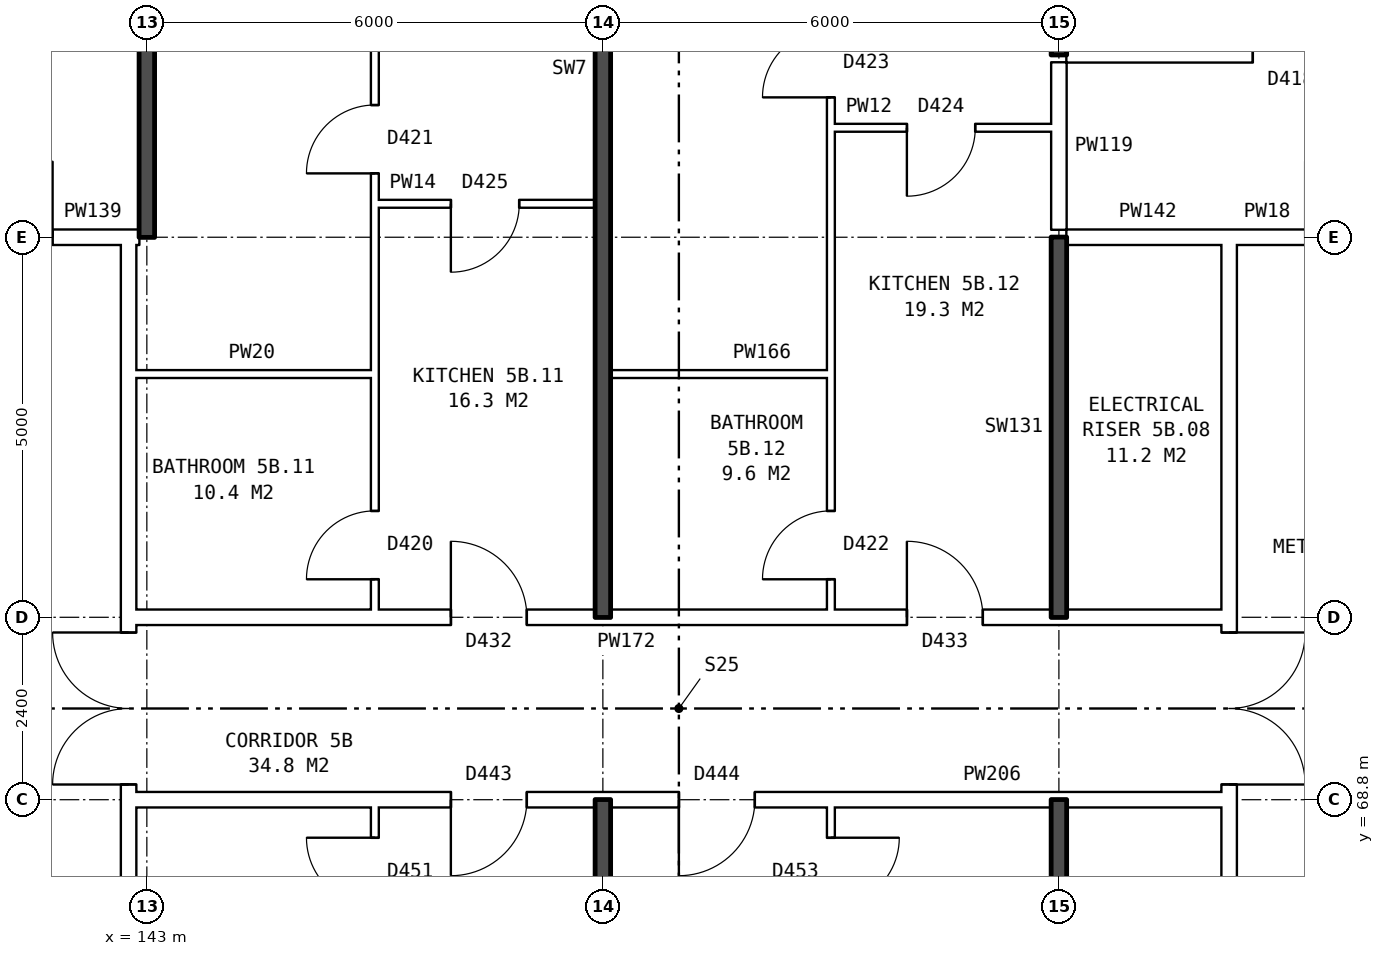
"""IFC4 building model, lengths in metres.
Left out: names, types, materials, properties, quantities, classifications, styles, units other than length and angle.
Written with IfcOpenShell. Run it as: python <this file> out.ifc"""

import sys

from ifc_helpers import new_model, si_unit, direction, frame, frame_2d, origin, place, context, subcontext, project, spatial, rectangle, extrude, element, fill, save


model = new_model("IFC4")
c1 = context("Model", 3, precision=1e-05, world=origin(), true_north=direction((0.0, 1.0)))
c2 = subcontext(c1, "Body", "Model", "MODEL_VIEW")
j1 = project(units=[si_unit("LENGTHUNIT", "METRE"), si_unit("PLANEANGLEUNIT", "RADIAN")], contexts=[c1])
p1 = place(None, origin())
s1 = spatial("IfcSite", under=j1, at=p1, CompositionType="ELEMENT")
p2 = place(p1, origin())
s2 = spatial("IfcBuilding", under=s1, at=p2, CompositionType="ELEMENT")
p3 = place(p2, frame((0.0, 0.0, 22.6)))
s3 = spatial("IfcBuildingStorey", under=s2, at=p3, CompositionType="ELEMENT", Elevation=22.6)
p4 = place(p3, frame((142.76, 63.9, 0.0), z_axis=(0.0, 0.0, 1.0), x_axis=(0.0, 1.0, 0.0)))
e1 = element("IfcWall", 1, at=p4, inside=s3, PredefinedType="PARTITIONING", context=c2, shape_type="SweptSolid", body=[
    extrude(rectangle(XDim=12.2, YDim=0.2, at=frame_2d((6.1, 0.0))), origin(), (0.0, 0.0, 1.0), 2.85),
])
p5 = place(p4, frame((5.1, 0.0, 0.0)))
e2 = element("IfcOpeningElement", 2, at=p5, cuts=e1, PredefinedType="OPENING", context=c2, shape_type="SweptSolid", body=[
    extrude(rectangle(XDim=2.0, YDim=2.1, at=frame_2d((1.0, 1.05))), frame((0.0, 0.11, 0.0), z_axis=(0.0, -1.0, 0.0), x_axis=(1.0, 0.0, 0.0)), (0.0, 0.0, 1.0), 0.22),
])
p6 = place(p3, frame((157.24, 63.9, 0.0), z_axis=(0.0, 0.0, 1.0), x_axis=(0.0, 1.0, 0.0)))
e3 = element("IfcWall", 3, at=p6, inside=s3, PredefinedType="PARTITIONING", context=c2, shape_type="SweptSolid", body=[
    extrude(rectangle(XDim=12.2, YDim=0.2, at=frame_2d((6.1, 0.0))), origin(), (0.0, 0.0, 1.0), 2.85),
])
p7 = place(p6, frame((5.1, 0.0, 0.0)))
e4 = element("IfcOpeningElement", 4, at=p7, cuts=e3, PredefinedType="OPENING", context=c2, shape_type="SweptSolid", body=[
    extrude(rectangle(XDim=2.0, YDim=2.1, at=frame_2d((1.0, 1.05))), frame((0.0, 0.11, 0.0), z_axis=(0.0, -1.0, 0.0), x_axis=(1.0, 0.0, 0.0)), (0.0, 0.0, 1.0), 0.22),
])
p8 = place(p3, frame((142.76, 68.8, 0.0), z_axis=(0.0, 0.0, 1.0), x_axis=(1.0, 0.0, 0.0)))
e5 = element("IfcWall", 5, at=p8, inside=s3, PredefinedType="PARTITIONING", context=c2, shape_type="SweptSolid", body=[
    extrude(rectangle(XDim=14.48, YDim=0.2, at=frame_2d((7.24, 0.0))), origin(), (0.0, 0.0, 1.0), 2.85),
])
p9 = place(p8, frame((4.24, 0.0, 0.0)))
e6 = element("IfcOpeningElement", 6, at=p9, cuts=e5, PredefinedType="OPENING", context=c2, shape_type="SweptSolid", body=[
    extrude(rectangle(XDim=1.0, YDim=2.1, at=frame_2d((0.5, 1.05))), frame((0.0, 0.11, 0.0), z_axis=(0.0, -1.0, 0.0), x_axis=(1.0, 0.0, 0.0)), (0.0, 0.0, 1.0), 0.22),
])
p10 = place(p8, frame((7.24, 0.0, 0.0)))
e7 = element("IfcOpeningElement", 7, at=p10, cuts=e5, PredefinedType="OPENING", context=c2, shape_type="SweptSolid", body=[
    extrude(rectangle(XDim=1.0, YDim=2.1, at=frame_2d((0.5, 1.05))), frame((0.0, 0.11, 0.0), z_axis=(0.0, -1.0, 0.0), x_axis=(1.0, 0.0, 0.0)), (0.0, 0.0, 1.0), 0.22),
])
p11 = place(p3, frame((142.76, 71.2, 0.0), z_axis=(0.0, 0.0, 1.0), x_axis=(1.0, 0.0, 0.0)))
e8 = element("IfcWall", 8, at=p11, inside=s3, PredefinedType="PARTITIONING", context=c2, shape_type="SweptSolid", body=[
    extrude(rectangle(XDim=14.48, YDim=0.2, at=frame_2d((7.24, 0.0))), origin(), (0.0, 0.0, 1.0), 2.85),
])
p12 = place(p11, frame((4.24, 0.0, 0.0)))
e9 = element("IfcOpeningElement", 9, at=p12, cuts=e8, PredefinedType="OPENING", context=c2, shape_type="SweptSolid", body=[
    extrude(rectangle(XDim=1.0, YDim=2.1, at=frame_2d((0.5, 1.05))), frame((0.0, 0.11, 0.0), z_axis=(0.0, -1.0, 0.0), x_axis=(1.0, 0.0, 0.0)), (0.0, 0.0, 1.0), 0.22),
])
p13 = place(p11, frame((10.24, 0.0, 0.0)))
e10 = element("IfcOpeningElement", 10, at=p13, cuts=e8, PredefinedType="OPENING", context=c2, shape_type="SweptSolid", body=[
    extrude(rectangle(XDim=1.0, YDim=2.1, at=frame_2d((0.5, 1.05))), frame((0.0, 0.11, 0.0), z_axis=(0.0, -1.0, 0.0), x_axis=(1.0, 0.0, 0.0)), (0.0, 0.0, 1.0), 0.22),
])
p14 = place(p3, frame((142.76, 74.4, 0.0), z_axis=(0.0, 0.0, 1.0), x_axis=(1.0, 0.0, 0.0)))
e11 = element("IfcWall", 11, at=p14, inside=s3, PredefinedType="PARTITIONING", context=c2, shape_type="SweptSolid", body=[
    extrude(rectangle(XDim=3.24, YDim=0.1, at=frame_2d((1.62, 0.0))), origin(), (0.0, 0.0, 1.0), 2.85),
])
p15 = place(p3, frame((149.1, 74.4, 0.0), z_axis=(0.0, 0.0, 1.0), x_axis=(1.0, 0.0, 0.0)))
e12 = element("IfcWall", 12, at=p15, inside=s3, PredefinedType="PARTITIONING", context=c2, shape_type="SweptSolid", body=[
    extrude(rectangle(XDim=2.9, YDim=0.1, at=frame_2d((1.45, 0.0))), origin(), (0.0, 0.0, 1.0), 2.85),
])
p16 = place(p3, frame((139.76, 76.2, 0.0), z_axis=(0.0, 0.0, 1.0), x_axis=(1.0, 0.0, 0.0)))
e13 = element("IfcWall", 13, at=p16, inside=s3, PredefinedType="PARTITIONING", context=c2, shape_type="SweptSolid", body=[
    extrude(rectangle(XDim=3.0, YDim=0.2, at=frame_2d((1.5, 0.0))), origin(), (0.0, 0.0, 1.0), 2.85),
])
p17 = place(p16, frame((1.0, 0.0, 0.0)))
e14 = element("IfcOpeningElement", 14, at=p17, cuts=e13, PredefinedType="OPENING", context=c2, shape_type="SweptSolid", body=[
    extrude(rectangle(XDim=1.0, YDim=2.1, at=frame_2d((0.5, 1.05))), frame((0.0, 0.11, 0.0), z_axis=(0.0, -1.0, 0.0), x_axis=(1.0, 0.0, 0.0)), (0.0, 0.0, 1.0), 0.22),
])
p18 = place(p3, frame((142.76, 76.2, 0.0), z_axis=(0.0, 0.0, 1.0), x_axis=(1.0, 0.0, 0.0)))
e15 = element("IfcWall", 15, at=p18, inside=s3, PredefinedType="PARTITIONING", context=c2, shape_type="SweptSolid", body=[
    extrude(rectangle(XDim=0.14, YDim=0.2, at=frame_2d((0.07, 0.0))), origin(), (0.0, 0.0, 1.0), 2.85),
])
p19 = place(p3, frame((155.1, 76.2, 0.0), z_axis=(0.0, 0.0, 1.0), x_axis=(1.0, 0.0, 0.0)))
e16 = element("IfcWall", 16, at=p19, inside=s3, PredefinedType="PARTITIONING", context=c2, shape_type="SweptSolid", body=[
    extrude(rectangle(XDim=2.14, YDim=0.2, at=frame_2d((1.07, 0.0))), origin(), (0.0, 0.0, 1.0), 2.85),
])
p20 = place(p3, frame((157.24, 76.2, 0.0), z_axis=(0.0, 0.0, 1.0), x_axis=(1.0, 0.0, 0.0)))
e17 = element("IfcWall", 17, at=p20, inside=s3, PredefinedType="PARTITIONING", context=c2, shape_type="SweptSolid", body=[
    extrude(rectangle(XDim=3.0, YDim=0.2, at=frame_2d((1.5, 0.0))), origin(), (0.0, 0.0, 1.0), 2.85),
])
p21 = place(p20, frame((1.0, 0.0, 0.0)))
e18 = element("IfcOpeningElement", 18, at=p21, cuts=e17, PredefinedType="OPENING", context=c2, shape_type="SweptSolid", body=[
    extrude(rectangle(XDim=1.0, YDim=2.1, at=frame_2d((0.5, 1.05))), frame((0.0, 0.11, 0.0), z_axis=(0.0, -1.0, 0.0), x_axis=(1.0, 0.0, 0.0)), (0.0, 0.0, 1.0), 0.22),
])
p22 = place(p3, frame((146.0, 76.64, 0.0), z_axis=(0.0, 0.0, 1.0), x_axis=(1.0, 0.0, 0.0)))
e19 = element("IfcWall", 19, at=p22, inside=s3, PredefinedType="PARTITIONING", context=c2, shape_type="SweptSolid", body=[
    extrude(rectangle(XDim=2.9, YDim=0.1, at=frame_2d((1.45, 0.0))), origin(), (0.0, 0.0, 1.0), 2.85),
])
p23 = place(p22, frame((1.0, 0.0, 0.0)))
e20 = element("IfcOpeningElement", 20, at=p23, cuts=e19, PredefinedType="OPENING", context=c2, shape_type="SweptSolid", body=[
    extrude(rectangle(XDim=0.9, YDim=2.1, at=frame_2d((0.45, 1.05))), frame((0.0, 0.06, 0.0), z_axis=(0.0, -1.0, 0.0), x_axis=(1.0, 0.0, 0.0)), (0.0, 0.0, 1.0), 0.12),
])
p24 = place(p3, frame((152.0, 77.64, 0.0), z_axis=(0.0, 0.0, 1.0), x_axis=(1.0, 0.0, 0.0)))
e21 = element("IfcWall", 21, at=p24, inside=s3, PredefinedType="PARTITIONING", context=c2, shape_type="SweptSolid", body=[
    extrude(rectangle(XDim=2.9, YDim=0.1, at=frame_2d((1.45, 0.0))), origin(), (0.0, 0.0, 1.0), 2.85),
])
p25 = place(p24, frame((1.0, 0.0, 0.0)))
e22 = element("IfcOpeningElement", 22, at=p25, cuts=e21, PredefinedType="OPENING", context=c2, shape_type="SweptSolid", body=[
    extrude(rectangle(XDim=0.9, YDim=2.1, at=frame_2d((0.45, 1.05))), frame((0.0, 0.06, 0.0), z_axis=(0.0, -1.0, 0.0), x_axis=(1.0, 0.0, 0.0)), (0.0, 0.0, 1.0), 0.12),
])
p26 = place(p3, frame((155.1, 78.6, 0.0), z_axis=(0.0, 0.0, 1.0), x_axis=(1.0, 0.0, 0.0)))
e23 = element("IfcWall", 23, at=p26, inside=s3, PredefinedType="PARTITIONING", context=c2, shape_type="SweptSolid", body=[
    extrude(rectangle(XDim=22.29, YDim=0.2, at=frame_2d((11.145, 0.0))), origin(), (0.0, 0.0, 1.0), 2.85),
])
p27 = place(p26, frame((2.45, 0.0, 0.0)))
e24 = element("IfcOpeningElement", 24, at=p27, cuts=e23, PredefinedType="OPENING", context=c2, shape_type="SweptSolid", body=[
    extrude(rectangle(XDim=1.0, YDim=2.1, at=frame_2d((0.5, 1.05))), frame((0.0, 0.11, 0.0), z_axis=(0.0, -1.0, 0.0), x_axis=(1.0, 0.0, 0.0)), (0.0, 0.0, 1.0), 0.22),
])
p28 = place(p26, frame((14.4, 0.0, 0.0)))
e25 = element("IfcOpeningElement", 25, at=p28, cuts=e23, PredefinedType="OPENING", context=c2, shape_type="SweptSolid", body=[
    extrude(rectangle(XDim=1.0, YDim=2.1, at=frame_2d((0.5, 1.05))), frame((0.0, 0.11, 0.0), z_axis=(0.0, -1.0, 0.0), x_axis=(1.0, 0.0, 0.0)), (0.0, 0.0, 1.0), 0.22),
])
p29 = place(p3, frame((143.0, 76.2, 0.0), z_axis=(0.0, 0.0, 1.0), x_axis=(0.0, 1.0, 0.0)))
e26 = element("IfcWall", 26, at=p29, inside=s3, PredefinedType="SOLIDWALL", context=c2, shape_type="SweptSolid", body=[
    extrude(rectangle(XDim=9.44, YDim=0.2, at=frame_2d((4.72, 0.0))), origin(), (0.0, 0.0, 1.0), 2.85),
])
p30 = place(p3, frame((146.0, 54.36, 0.0), z_axis=(0.0, 0.0, 1.0), x_axis=(0.0, 1.0, 0.0)))
e27 = element("IfcWall", 27, at=p30, inside=s3, PredefinedType="PARTITIONING", context=c2, shape_type="SweptSolid", body=[
    extrude(rectangle(XDim=14.34, YDim=0.1, at=frame_2d((7.17, 0.0))), origin(), (0.0, 0.0, 1.0), 2.85),
])
p31 = place(p30, frame((7.7, 0.0, 0.0)))
e28 = element("IfcOpeningElement", 28, at=p31, cuts=e27, PredefinedType="OPENING", context=c2, shape_type="SweptSolid", body=[
    extrude(rectangle(XDim=0.9, YDim=2.1, at=frame_2d((0.45, 1.05))), frame((0.0, 0.06, 0.0), z_axis=(0.0, -1.0, 0.0), x_axis=(1.0, 0.0, 0.0)), (0.0, 0.0, 1.0), 0.12),
])
p32 = place(p30, frame((13.04, 0.0, 0.0)))
e29 = element("IfcOpeningElement", 29, at=p32, cuts=e27, PredefinedType="OPENING", context=c2, shape_type="SweptSolid", body=[
    extrude(rectangle(XDim=0.9, YDim=2.1, at=frame_2d((0.45, 1.05))), frame((0.0, 0.06, 0.0), z_axis=(0.0, -1.0, 0.0), x_axis=(1.0, 0.0, 0.0)), (0.0, 0.0, 1.0), 0.12),
])
p33 = place(p3, frame((146.0, 71.3, 0.0), z_axis=(0.0, 0.0, 1.0), x_axis=(0.0, 1.0, 0.0)))
e30 = element("IfcWall", 30, at=p33, inside=s3, PredefinedType="PARTITIONING", context=c2, shape_type="SweptSolid", body=[
    extrude(rectangle(XDim=14.34, YDim=0.1, at=frame_2d((7.17, 0.0))), origin(), (0.0, 0.0, 1.0), 2.85),
])
p34 = place(p33, frame((5.74, 0.0, 0.0)))
e31 = element("IfcOpeningElement", 31, at=p34, cuts=e30, PredefinedType="OPENING", context=c2, shape_type="SweptSolid", body=[
    extrude(rectangle(XDim=0.9, YDim=2.1, at=frame_2d((0.45, 1.05))), frame((0.0, 0.06, 0.0), z_axis=(0.0, -1.0, 0.0), x_axis=(1.0, 0.0, 0.0)), (0.0, 0.0, 1.0), 0.12),
])
p35 = place(p33, frame((0.4, 0.0, 0.0)))
e32 = element("IfcOpeningElement", 32, at=p35, cuts=e30, PredefinedType="OPENING", context=c2, shape_type="SweptSolid", body=[
    extrude(rectangle(XDim=0.9, YDim=2.1, at=frame_2d((0.45, 1.05))), frame((0.0, 0.06, 0.0), z_axis=(0.0, -1.0, 0.0), x_axis=(1.0, 0.0, 0.0)), (0.0, 0.0, 1.0), 0.12),
])
for number, where, z_axis, x_axis in (
    (33, (149.0, 54.36, 0.0), (0.0, 0.0, 1.0), (0.0, 1.0, 0.0)),
    (34, (149.0, 71.2, 0.0), (0.0, 0.0, 1.0), (0.0, 1.0, 0.0)),
):
    element("IfcWall", number, at=place(p3, frame(where, z_axis=z_axis, x_axis=x_axis)), inside=s3, PredefinedType="SOLIDWALL", context=c2, shape_type="SweptSolid", body=[
        extrude(rectangle(XDim=14.44, YDim=0.2, at=frame_2d((7.22, 0.0))), origin(), (0.0, 0.0, 1.0), 2.85),
    ])
p36 = place(p3, frame((152.0, 54.36, 0.0), z_axis=(0.0, 0.0, 1.0), x_axis=(0.0, 1.0, 0.0)))
e35 = element("IfcWall", 35, at=p36, inside=s3, PredefinedType="PARTITIONING", context=c2, shape_type="SweptSolid", body=[
    extrude(rectangle(XDim=14.34, YDim=0.1, at=frame_2d((7.17, 0.0))), origin(), (0.0, 0.0, 1.0), 2.85),
])
p37 = place(p36, frame((4.2, 0.0, 0.0)))
e36 = element("IfcOpeningElement", 36, at=p37, cuts=e35, PredefinedType="OPENING", context=c2, shape_type="SweptSolid", body=[
    extrude(rectangle(XDim=0.9, YDim=2.1, at=frame_2d((0.45, 1.05))), frame((0.0, 0.06, 0.0), z_axis=(0.0, -1.0, 0.0), x_axis=(1.0, 0.0, 0.0)), (0.0, 0.0, 1.0), 0.12),
])
p38 = place(p36, frame((13.04, 0.0, 0.0)))
e37 = element("IfcOpeningElement", 37, at=p38, cuts=e35, PredefinedType="OPENING", context=c2, shape_type="SweptSolid", body=[
    extrude(rectangle(XDim=0.9, YDim=2.1, at=frame_2d((0.45, 1.05))), frame((0.0, 0.06, 0.0), z_axis=(0.0, -1.0, 0.0), x_axis=(1.0, 0.0, 0.0)), (0.0, 0.0, 1.0), 0.12),
])
p39 = place(p3, frame((152.0, 71.3, 0.0), z_axis=(0.0, 0.0, 1.0), x_axis=(0.0, 1.0, 0.0)))
e38 = element("IfcWall", 38, at=p39, inside=s3, PredefinedType="PARTITIONING", context=c2, shape_type="SweptSolid", body=[
    extrude(rectangle(XDim=14.34, YDim=0.1, at=frame_2d((7.17, 0.0))), origin(), (0.0, 0.0, 1.0), 2.85),
])
p40 = place(p39, frame((6.74, 0.0, 0.0)))
e39 = element("IfcOpeningElement", 39, at=p40, cuts=e38, PredefinedType="OPENING", context=c2, shape_type="SweptSolid", body=[
    extrude(rectangle(XDim=0.9, YDim=2.1, at=frame_2d((0.45, 1.05))), frame((0.0, 0.06, 0.0), z_axis=(0.0, -1.0, 0.0), x_axis=(1.0, 0.0, 0.0)), (0.0, 0.0, 1.0), 0.12),
])
p41 = place(p39, frame((0.4, 0.0, 0.0)))
e40 = element("IfcOpeningElement", 40, at=p41, cuts=e38, PredefinedType="OPENING", context=c2, shape_type="SweptSolid", body=[
    extrude(rectangle(XDim=0.9, YDim=2.1, at=frame_2d((0.45, 1.05))), frame((0.0, 0.06, 0.0), z_axis=(0.0, -1.0, 0.0), x_axis=(1.0, 0.0, 0.0)), (0.0, 0.0, 1.0), 0.12),
])
for number, where, z_axis, x_axis in (
    (41, (155.0, 63.8, 0.0), (0.0, 0.0, 1.0), (0.0, 1.0, 0.0)),
    (42, (155.0, 71.2, 0.0), (0.0, 0.0, 1.0), (0.0, 1.0, 0.0)),
):
    element("IfcWall", number, at=place(p3, frame(where, z_axis=z_axis, x_axis=x_axis)), inside=s3, PredefinedType="SOLIDWALL", context=c2, shape_type="SweptSolid", body=[
        extrude(rectangle(XDim=5.0, YDim=0.2, at=frame_2d((2.5, 0.0))), origin(), (0.0, 0.0, 1.0), 2.85),
    ])
p42 = place(p3, frame((155.0, 76.3, 0.0), z_axis=(0.0, 0.0, 1.0), x_axis=(0.0, 1.0, 0.0)))
e43 = element("IfcWall", 43, at=p42, inside=s3, PredefinedType="PARTITIONING", context=c2, shape_type="SweptSolid", body=[
    extrude(rectangle(XDim=2.2, YDim=0.2, at=frame_2d((1.1, 0.0))), origin(), (0.0, 0.0, 1.0), 2.85),
])
p43 = place(p3, frame((155.0, 78.6, 0.0), z_axis=(0.0, 0.0, 1.0), x_axis=(0.0, 1.0, 0.0)))
e44 = element("IfcWall", 44, at=p43, inside=s3, PredefinedType="SOLIDWALL", context=c2, shape_type="SweptSolid", body=[
    extrude(rectangle(XDim=7.04, YDim=0.2, at=frame_2d((3.52, 0.0))), origin(), (0.0, 0.0, 1.0), 2.85),
])
p44 = place(p5, origin())
e45 = element("IfcDoor", 45, at=p44, inside=s3, OperationType="DOUBLE_DOOR_SINGLE_SWING", PredefinedType="DOOR", context=c2, shape_type="SweptSolid", body=[
    extrude(rectangle(XDim=2.0, YDim=2.1, at=frame_2d((1.0, 1.05))), frame((0.0, 0.025, 0.0), z_axis=(0.0, -1.0, 0.0), x_axis=(1.0, 0.0, 0.0)), (0.0, 0.0, 1.0), 0.05),
])
fill(e2, e45)
p45 = place(p7, frame((2.0, 0.0, 0.0), z_axis=(0.0, 0.0, 1.0), x_axis=(-1.0, 0.0, 0.0)))
e46 = element("IfcDoor", 46, at=p45, inside=s3, OperationType="DOUBLE_DOOR_SINGLE_SWING", PredefinedType="DOOR", context=c2, shape_type="SweptSolid", body=[
    extrude(rectangle(XDim=2.0, YDim=2.1, at=frame_2d((1.0, 1.05))), frame((0.0, 0.025, 0.0), z_axis=(0.0, -1.0, 0.0), x_axis=(1.0, 0.0, 0.0)), (0.0, 0.0, 1.0), 0.05),
])
fill(e4, e46)
p46 = place(p9, frame((1.0, 0.0, 0.0), z_axis=(0.0, 0.0, 1.0), x_axis=(-1.0, 0.0, 0.0)))
e47 = element("IfcDoor", 47, at=p46, inside=s3, OperationType="SINGLE_SWING_RIGHT", PredefinedType="DOOR", context=c2, shape_type="SweptSolid", body=[
    extrude(rectangle(XDim=1.0, YDim=2.1, at=frame_2d((0.5, 1.05))), frame((0.0, 0.025, 0.0), z_axis=(0.0, -1.0, 0.0), x_axis=(1.0, 0.0, 0.0)), (0.0, 0.0, 1.0), 0.05),
])
fill(e6, e47)
p47 = place(p32, origin())
e48 = element("IfcDoor", 48, at=p47, inside=s3, OperationType="SINGLE_SWING_RIGHT", PredefinedType="DOOR", context=c2, shape_type="SweptSolid", body=[
    extrude(rectangle(XDim=0.9, YDim=2.1, at=frame_2d((0.45, 1.05))), frame((0.0, 0.025, 0.0), z_axis=(0.0, -1.0, 0.0), x_axis=(1.0, 0.0, 0.0)), (0.0, 0.0, 1.0), 0.05),
])
fill(e29, e48)
p48 = place(p10, frame((1.0, 0.0, 0.0), z_axis=(0.0, 0.0, 1.0), x_axis=(-1.0, 0.0, 0.0)))
e49 = element("IfcDoor", 49, at=p48, inside=s3, OperationType="SINGLE_SWING_RIGHT", PredefinedType="DOOR", context=c2, shape_type="SweptSolid", body=[
    extrude(rectangle(XDim=1.0, YDim=2.1, at=frame_2d((0.5, 1.05))), frame((0.0, 0.025, 0.0), z_axis=(0.0, -1.0, 0.0), x_axis=(1.0, 0.0, 0.0)), (0.0, 0.0, 1.0), 0.05),
])
fill(e7, e49)
p49 = place(p38, frame((0.9, 0.0, 0.0), z_axis=(0.0, 0.0, 1.0), x_axis=(-1.0, 0.0, 0.0)))
e50 = element("IfcDoor", 50, at=p49, inside=s3, OperationType="SINGLE_SWING_LEFT", PredefinedType="DOOR", context=c2, shape_type="SweptSolid", body=[
    extrude(rectangle(XDim=0.9, YDim=2.1, at=frame_2d((0.45, 1.05))), frame((0.0, 0.025, 0.0), z_axis=(0.0, -1.0, 0.0), x_axis=(1.0, 0.0, 0.0)), (0.0, 0.0, 1.0), 0.05),
])
fill(e37, e50)
p50 = place(p34, origin())
e51 = element("IfcDoor", 51, at=p50, inside=s3, OperationType="SINGLE_SWING_LEFT", PredefinedType="DOOR", context=c2, shape_type="SweptSolid", body=[
    extrude(rectangle(XDim=0.9, YDim=2.1, at=frame_2d((0.45, 1.05))), frame((0.0, 0.025, 0.0), z_axis=(0.0, -1.0, 0.0), x_axis=(1.0, 0.0, 0.0)), (0.0, 0.0, 1.0), 0.05),
])
fill(e31, e51)
p51 = place(p12, origin())
e52 = element("IfcDoor", 52, at=p51, inside=s3, OperationType="SINGLE_SWING_LEFT", PredefinedType="DOOR", context=c2, shape_type="SweptSolid", body=[
    extrude(rectangle(XDim=1.0, YDim=2.1, at=frame_2d((0.5, 1.05))), frame((0.0, 0.025, 0.0), z_axis=(0.0, -1.0, 0.0), x_axis=(1.0, 0.0, 0.0)), (0.0, 0.0, 1.0), 0.05),
])
fill(e9, e52)
p52 = place(p23, frame((0.9, 0.0, 0.0), z_axis=(0.0, 0.0, 1.0), x_axis=(-1.0, 0.0, 0.0)))
e53 = element("IfcDoor", 53, at=p52, inside=s3, OperationType="SINGLE_SWING_RIGHT", PredefinedType="DOOR", context=c2, shape_type="SweptSolid", body=[
    extrude(rectangle(XDim=0.9, YDim=2.1, at=frame_2d((0.45, 1.05))), frame((0.0, 0.025, 0.0), z_axis=(0.0, -1.0, 0.0), x_axis=(1.0, 0.0, 0.0)), (0.0, 0.0, 1.0), 0.05),
])
fill(e20, e53)
p53 = place(p35, origin())
e54 = element("IfcDoor", 54, at=p53, inside=s3, OperationType="SINGLE_SWING_LEFT", PredefinedType="DOOR", context=c2, shape_type="SweptSolid", body=[
    extrude(rectangle(XDim=0.9, YDim=2.1, at=frame_2d((0.45, 1.05))), frame((0.0, 0.025, 0.0), z_axis=(0.0, -1.0, 0.0), x_axis=(1.0, 0.0, 0.0)), (0.0, 0.0, 1.0), 0.05),
])
fill(e32, e54)
p54 = place(p40, origin())
e55 = element("IfcDoor", 55, at=p54, inside=s3, OperationType="SINGLE_SWING_LEFT", PredefinedType="DOOR", context=c2, shape_type="SweptSolid", body=[
    extrude(rectangle(XDim=0.9, YDim=2.1, at=frame_2d((0.45, 1.05))), frame((0.0, 0.025, 0.0), z_axis=(0.0, -1.0, 0.0), x_axis=(1.0, 0.0, 0.0)), (0.0, 0.0, 1.0), 0.05),
])
fill(e39, e55)
p55 = place(p13, origin())
e56 = element("IfcDoor", 56, at=p55, inside=s3, OperationType="SINGLE_SWING_LEFT", PredefinedType="DOOR", context=c2, shape_type="SweptSolid", body=[
    extrude(rectangle(XDim=1.0, YDim=2.1, at=frame_2d((0.5, 1.05))), frame((0.0, 0.025, 0.0), z_axis=(0.0, -1.0, 0.0), x_axis=(1.0, 0.0, 0.0)), (0.0, 0.0, 1.0), 0.05),
])
fill(e10, e56)
p56 = place(p25, frame((0.9, 0.0, 0.0), z_axis=(0.0, 0.0, 1.0), x_axis=(-1.0, 0.0, 0.0)))
e57 = element("IfcDoor", 57, at=p56, inside=s3, OperationType="SINGLE_SWING_RIGHT", PredefinedType="DOOR", context=c2, shape_type="SweptSolid", body=[
    extrude(rectangle(XDim=0.9, YDim=2.1, at=frame_2d((0.45, 1.05))), frame((0.0, 0.025, 0.0), z_axis=(0.0, -1.0, 0.0), x_axis=(1.0, 0.0, 0.0)), (0.0, 0.0, 1.0), 0.05),
])
fill(e22, e57)
p57 = place(p41, origin())
e58 = element("IfcDoor", 58, at=p57, inside=s3, OperationType="SINGLE_SWING_LEFT", PredefinedType="DOOR", context=c2, shape_type="SweptSolid", body=[
    extrude(rectangle(XDim=0.9, YDim=2.1, at=frame_2d((0.45, 1.05))), frame((0.0, 0.025, 0.0), z_axis=(0.0, -1.0, 0.0), x_axis=(1.0, 0.0, 0.0)), (0.0, 0.0, 1.0), 0.05),
])
fill(e40, e58)
p58 = place(p27, origin())
e59 = element("IfcDoor", 59, at=p58, inside=s3, OperationType="SINGLE_SWING_RIGHT", PredefinedType="DOOR", context=c2, shape_type="SweptSolid", body=[
    extrude(rectangle(XDim=1.0, YDim=2.1, at=frame_2d((0.5, 1.05))), frame((0.0, 0.025, 0.0), z_axis=(0.0, -1.0, 0.0), x_axis=(1.0, 0.0, 0.0)), (0.0, 0.0, 1.0), 0.05),
])
fill(e24, e59)
save(model, sys.argv[1])
